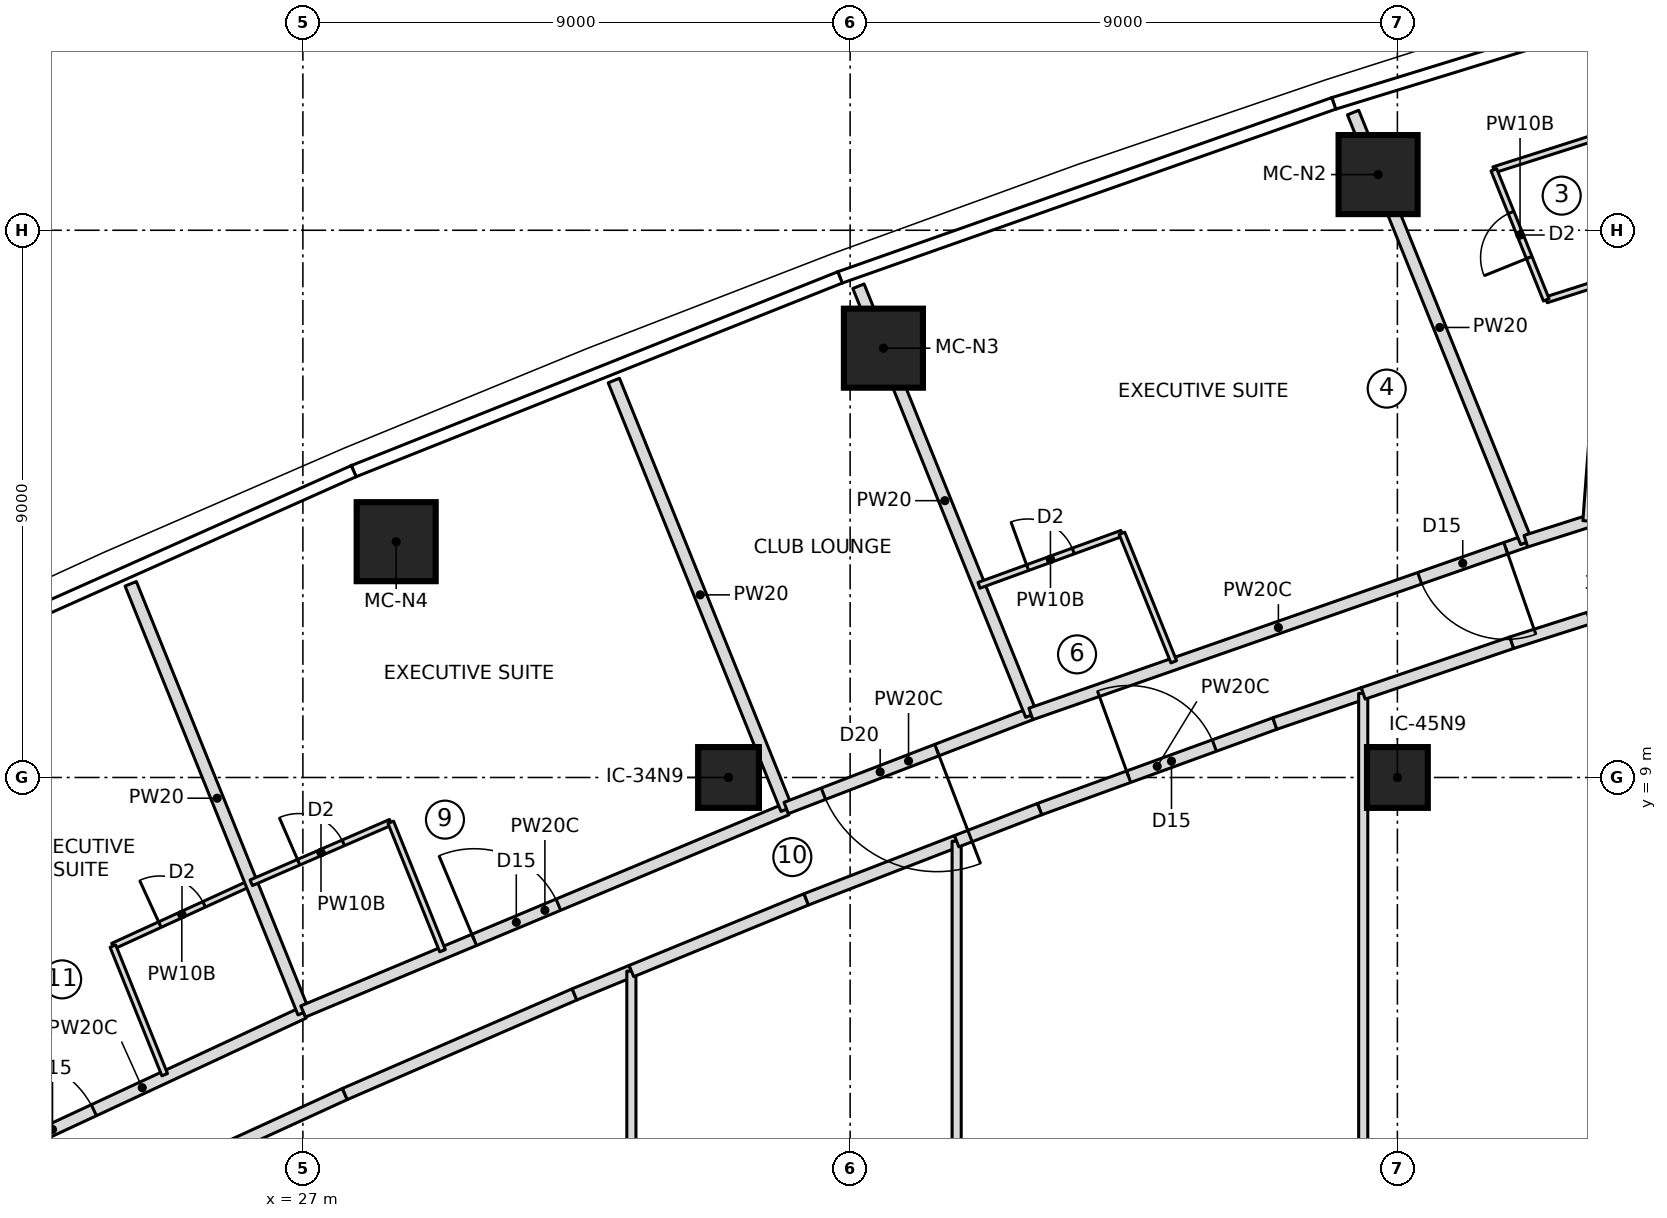
"""IFC4 building model, lengths in metres.
Left out: names, types, materials, properties, quantities, classifications, styles, units other than length and angle.
Written with IfcOpenShell. Run it as: python <this file> out.ifc"""

import sys

from ifc_helpers import new_model, si_unit, direction, frame, frame_2d, origin, origin_2d, place, context, subcontext, project, spatial, rectangle, extrude, element, fill, save


model = new_model("IFC4")
c1 = context("Model", 3, precision=1e-05, world=origin(), true_north=direction((0.0, 1.0)))
c2 = subcontext(c1, "Body", "Model", "MODEL_VIEW")
j1 = project(units=[si_unit("LENGTHUNIT", "METRE"), si_unit("PLANEANGLEUNIT", "RADIAN")], contexts=[c1])
p1 = place(None, origin())
s1 = spatial("IfcSite", under=j1, at=p1, CompositionType="ELEMENT")
p2 = place(p1, origin())
s2 = spatial("IfcBuilding", under=s1, at=p2, CompositionType="ELEMENT")
p3 = place(p2, frame((0.0, 0.0, 200.35)))
s3 = spatial("IfcBuildingStorey", under=s2, at=p3, CompositionType="ELEMENT", Elevation=200.35)
for number, where, z_axis, x_axis in (
    (1, (44.683, 18.916, 0.0), (0.0, 0.0, 1.0), (1.0, 0.0, 0.0)),
    (2, (36.547, 16.061, 0.0), (0.0, 0.0, 1.0), (1.0, 0.0, 0.0)),
    (3, (28.534, 12.878, 0.0), (0.0, 0.0, 1.0), (1.0, 0.0, 0.0)),
):
    element("IfcColumn", number, at=place(p3, frame(where, z_axis=z_axis, x_axis=x_axis)), inside=s3, PredefinedType="COLUMN", context=c2, shape_type="SweptSolid", body=[
        extrude(rectangle(XDim=1.3, YDim=1.3, at=origin_2d()), origin(), (0.0, 0.0, 1.0), 3.55),
    ])
for number, where, z_axis, x_axis in (
    (4, (34.0, 9.0, 0.0), (0.0, 0.0, 1.0), (1.0, 0.0, 0.0)),
    (5, (45.0, 9.0, 0.0), (0.0, 0.0, 1.0), (1.0, 0.0, 0.0)),
):
    element("IfcColumn", number, at=place(p3, frame(where, z_axis=z_axis, x_axis=x_axis)), inside=s3, PredefinedType="COLUMN", context=c2, shape_type="SweptSolid", body=[
        extrude(rectangle(XDim=1.0, YDim=1.0, at=origin_2d()), origin(), (0.0, 0.0, 1.0), 3.55),
    ])
p4 = place(p3, frame((21.704, 2.663, 0.0), z_axis=(0.0, 0.0, 1.0), x_axis=(0.906619470853, 0.421949209112, 0.0)))
e6 = element("IfcWall", 6, at=p4, inside=s3, PredefinedType="PARTITIONING", context=c2, shape_type="SweptSolid", body=[
    extrude(rectangle(XDim=5.854, YDim=0.2, at=frame_2d((2.927, 0.0))), origin(), (0.0, 0.0, 1.0), 3.25),
])
p5 = place(p4, frame((0.55, 0.0, 0.0)))
e7 = element("IfcOpeningElement", 7, at=p5, cuts=e6, PredefinedType="OPENING", context=c2, shape_type="SweptSolid", body=[
    extrude(rectangle(XDim=1.5, YDim=2.1, at=frame_2d((0.75, 1.05))), frame((0.0, 0.11, 0.0), z_axis=(0.0, -1.0, 0.0), x_axis=(1.0, 0.0, 0.0)), (0.0, 0.0, 1.0), 0.22),
])
p6 = place(p3, frame((23.875, 6.226, 0.0), z_axis=(0.0, 0.0, 1.0), x_axis=(0.909145169949, 0.416479363183, 0.0)))
e8 = element("IfcWall", 8, at=p6, inside=s3, PredefinedType="PARTITIONING", context=c2, shape_type="SweptSolid", body=[
    extrude(rectangle(XDim=2.493, YDim=0.1, at=frame_2d((1.247, 0.0))), origin(), (0.0, 0.0, 1.0), 3.25),
])
p7 = place(p6, frame((0.85, 0.0, 0.0)))
e9 = element("IfcOpeningElement", 9, at=p7, cuts=e8, PredefinedType="OPENING", context=c2, shape_type="SweptSolid", body=[
    extrude(rectangle(XDim=0.8, YDim=2.1, at=frame_2d((0.4, 1.05))), frame((0.0, 0.06, 0.0), z_axis=(0.0, -1.0, 0.0), x_axis=(1.0, 0.0, 0.0)), (0.0, 0.0, 1.0), 0.12),
])
p8 = place(p3, frame((24.728, 4.112, 0.0), z_axis=(0.0, 0.0, 1.0), x_axis=(-0.373790023037, 0.927513352291, 0.0)))
e10 = element("IfcWall", 10, at=p8, inside=s3, PredefinedType="PARTITIONING", context=c2, shape_type="SweptSolid", body=[
    extrude(rectangle(XDim=2.28, YDim=0.1, at=frame_2d((1.14, 0.0))), origin(), (0.0, 0.0, 1.0), 3.25),
])
p9 = place(p3, frame((27.012, 5.133, 0.0), z_axis=(0.0, 0.0, 1.0), x_axis=(-0.373913547423, 0.927463562116, 0.0)))
e11 = element("IfcWall", 11, at=p9, inside=s3, PredefinedType="PARTITIONING", context=c2, shape_type="SweptSolid", body=[
    extrude(rectangle(XDim=7.604, YDim=0.2, at=frame_2d((3.802, 0.0))), origin(), (0.0, 0.0, 1.0), 3.25),
])
p10 = place(p3, frame((27.004, 5.151, 0.0), z_axis=(0.0, 0.0, 1.0), x_axis=(0.922490953728, 0.386018704586, 0.0)))
e12 = element("IfcWall", 12, at=p10, inside=s3, PredefinedType="PARTITIONING", context=c2, shape_type="SweptSolid", body=[
    extrude(rectangle(XDim=8.62, YDim=0.2, at=frame_2d((4.31, 0.0))), origin(), (0.0, 0.0, 1.0), 3.25),
])
p11 = place(p10, frame((3.05, 0.0, 0.0)))
e13 = element("IfcOpeningElement", 13, at=p11, cuts=e12, PredefinedType="OPENING", context=c2, shape_type="SweptSolid", body=[
    extrude(rectangle(XDim=1.5, YDim=2.1, at=frame_2d((0.75, 1.05))), frame((0.0, 0.11, 0.0), z_axis=(0.0, -1.0, 0.0), x_axis=(1.0, 0.0, 0.0)), (0.0, 0.0, 1.0), 0.22),
])
p12 = place(p3, frame((26.151, 7.268, 0.0), z_axis=(0.0, 0.0, 1.0), x_axis=(0.917378641232, 0.398015613526, 0.0)))
e14 = element("IfcWall", 14, at=p12, inside=s3, PredefinedType="PARTITIONING", context=c2, shape_type="SweptSolid", body=[
    extrude(rectangle(XDim=2.501, YDim=0.1, at=frame_2d((1.25, 0.0))), origin(), (0.0, 0.0, 1.0), 3.25),
])
p13 = place(p12, frame((0.85, 0.0, 0.0)))
e15 = element("IfcOpeningElement", 15, at=p13, cuts=e14, PredefinedType="OPENING", context=c2, shape_type="SweptSolid", body=[
    extrude(rectangle(XDim=0.8, YDim=2.1, at=frame_2d((0.4, 1.05))), frame((0.0, 0.06, 0.0), z_axis=(0.0, -1.0, 0.0), x_axis=(1.0, 0.0, 0.0)), (0.0, 0.0, 1.0), 0.12),
])
p14 = place(p3, frame((28.445, 8.263, 0.0), z_axis=(0.0, 0.0, 1.0), x_axis=(0.373902898623, -0.927467855185, 0.0)))
e16 = element("IfcWall", 16, at=p14, inside=s3, PredefinedType="PARTITIONING", context=c2, shape_type="SweptSolid", body=[
    extrude(rectangle(XDim=2.278, YDim=0.1, at=frame_2d((1.139, 0.0))), origin(), (0.0, 0.0, 1.0), 3.25),
])
p15 = place(p3, frame((34.956, 8.479, 0.0), z_axis=(0.0, 0.0, 1.0), x_axis=(-0.373881438439, 0.927476506436, 0.0)))
e17 = element("IfcWall", 17, at=p15, inside=s3, PredefinedType="PARTITIONING", context=c2, shape_type="SweptSolid", body=[
    extrude(rectangle(XDim=7.601, YDim=0.2, at=frame_2d((3.8, 0.0))), origin(), (0.0, 0.0, 1.0), 3.25),
])
p16 = place(p3, frame((38.972, 10.045, 0.0), z_axis=(0.0, 0.0, 1.0), x_axis=(-0.93335728106, -0.358948723208, 0.0)))
e18 = element("IfcWall", 18, at=p16, inside=s3, PredefinedType="PARTITIONING", context=c2, shape_type="SweptSolid", body=[
    extrude(rectangle(XDim=4.312, YDim=0.2, at=frame_2d((2.156, 0.0))), origin(), (0.0, 0.0, 1.0), 3.25),
])
p17 = place(p16, frame((1.656, 0.0, 0.0)))
e19 = element("IfcOpeningElement", 19, at=p17, cuts=e18, PredefinedType="OPENING", context=c2, shape_type="SweptSolid", body=[
    extrude(rectangle(XDim=2.0, YDim=2.4, at=frame_2d((1.0, 1.2))), frame((0.0, 0.11, 0.0), z_axis=(0.0, -1.0, 0.0), x_axis=(1.0, 0.0, 0.0)), (0.0, 0.0, 1.0), 0.22),
])
p18 = place(p3, frame((38.98, 10.026, 0.0), z_axis=(0.0, 0.0, 1.0), x_axis=(-0.373863662938, 0.927483671843, 0.0)))
e20 = element("IfcWall", 20, at=p18, inside=s3, PredefinedType="PARTITIONING", context=c2, shape_type="SweptSolid", body=[
    extrude(rectangle(XDim=7.604, YDim=0.2, at=frame_2d((3.802, 0.0))), origin(), (0.0, 0.0, 1.0), 3.25),
])
p19 = place(p3, frame((47.113, 12.886, 0.0), z_axis=(0.0, 0.0, 1.0), x_axis=(-0.944155939639, -0.329498955453, 0.0)))
e21 = element("IfcWall", 21, at=p19, inside=s3, PredefinedType="PARTITIONING", context=c2, shape_type="SweptSolid", body=[
    extrude(rectangle(XDim=8.622, YDim=0.2, at=frame_2d((4.311, 0.0))), origin(), (0.0, 0.0, 1.0), 3.25),
])
p20 = place(p19, frame((0.35, 0.0, 0.0)))
e22 = element("IfcOpeningElement", 22, at=p20, cuts=e21, PredefinedType="OPENING", context=c2, shape_type="SweptSolid", body=[
    extrude(rectangle(XDim=1.5, YDim=2.1, at=frame_2d((0.75, 1.05))), frame((0.0, 0.11, 0.0), z_axis=(0.0, -1.0, 0.0), x_axis=(1.0, 0.0, 0.0)), (0.0, 0.0, 1.0), 0.22),
])
p21 = place(p3, frame((38.119, 12.161, 0.0), z_axis=(0.0, 0.0, 1.0), x_axis=(0.939744972593, 0.341876273652, 0.0)))
e23 = element("IfcWall", 23, at=p21, inside=s3, PredefinedType="PARTITIONING", context=c2, shape_type="SweptSolid", body=[
    extrude(rectangle(XDim=2.501, YDim=0.1, at=frame_2d((1.251, 0.0))), origin(), (0.0, 0.0, 1.0), 3.25),
])
p22 = place(p21, frame((0.85, 0.0, 0.0)))
e24 = element("IfcOpeningElement", 24, at=p22, cuts=e23, PredefinedType="OPENING", context=c2, shape_type="SweptSolid", body=[
    extrude(rectangle(XDim=0.8, YDim=2.1, at=frame_2d((0.4, 1.05))), frame((0.0, 0.06, 0.0), z_axis=(0.0, -1.0, 0.0), x_axis=(1.0, 0.0, 0.0)), (0.0, 0.0, 1.0), 0.12),
])
p23 = place(p3, frame((40.47, 13.016, 0.0), z_axis=(0.0, 0.0, 1.0), x_axis=(0.373846436826, -0.927490615409, 0.0)))
e25 = element("IfcWall", 25, at=p23, inside=s3, PredefinedType="PARTITIONING", context=c2, shape_type="SweptSolid", body=[
    extrude(rectangle(XDim=2.279, YDim=0.1, at=frame_2d((1.139, 0.0))), origin(), (0.0, 0.0, 1.0), 3.25),
])
p24 = place(p3, frame((47.121, 12.867, 0.0), z_axis=(0.0, 0.0, 1.0), x_axis=(-0.373907892596, 0.92746584188, 0.0)))
e26 = element("IfcWall", 26, at=p24, inside=s3, PredefinedType="PARTITIONING", context=c2, shape_type="SweptSolid", body=[
    extrude(rectangle(XDim=7.621, YDim=0.2, at=frame_2d((3.811, 0.0))), origin(), (0.0, 0.0, 1.0), 3.25),
])
p25 = place(p3, frame((46.586, 18.994, 0.0), z_axis=(0.0, 0.0, 1.0), x_axis=(0.952696570315, 0.303923090451, 0.0)))
e27 = element("IfcWall", 27, at=p25, inside=s3, PredefinedType="PARTITIONING", context=c2, shape_type="SweptSolid", body=[
    extrude(rectangle(XDim=1.933, YDim=0.1, at=frame_2d((0.966, 0.0))), origin(), (0.0, 0.0, 1.0), 3.25),
])
p26 = place(p3, frame((48.427, 17.167, 0.0), z_axis=(0.0, 0.0, 1.0), x_axis=(-0.952763220029, -0.303714086864, 0.0)))
e28 = element("IfcWall", 28, at=p26, inside=s3, PredefinedType="PARTITIONING", context=c2, shape_type="SweptSolid", body=[
    extrude(rectangle(XDim=1.027, YDim=0.1, at=frame_2d((0.513, 0.0))), origin(), (0.0, 0.0, 1.0), 3.25),
])
p27 = place(p3, frame((47.448, 16.855, 0.0), z_axis=(0.0, 0.0, 1.0), x_axis=(-0.373817051068, 0.927502459474, 0.0)))
e29 = element("IfcWall", 29, at=p27, inside=s3, PredefinedType="PARTITIONING", context=c2, shape_type="SweptSolid", body=[
    extrude(rectangle(XDim=2.306, YDim=0.1, at=frame_2d((1.153, 0.0))), origin(), (0.0, 0.0, 1.0), 3.25),
])
p28 = place(p27, frame((0.75, 0.0, 0.0)))
e30 = element("IfcOpeningElement", 30, at=p28, cuts=e29, PredefinedType="OPENING", context=c2, shape_type="SweptSolid", body=[
    extrude(rectangle(XDim=0.8, YDim=2.1, at=frame_2d((0.4, 1.05))), frame((0.0, 0.06, 0.0), z_axis=(0.0, -1.0, 0.0), x_axis=(1.0, 0.0, 0.0)), (0.0, 0.0, 1.0), 0.12),
])
p29 = place(p3, frame((23.947, 2.079, 0.0), z_axis=(0.0, 0.0, 1.0), x_axis=(0.909180834404, 0.416401501382, 0.0)))
e31 = element("IfcWall", 31, at=p29, inside=s3, PredefinedType="PARTITIONING", context=c2, shape_type="SweptSolid", body=[
    extrude(rectangle(XDim=4.117, YDim=0.2, at=frame_2d((2.059, 0.0))), origin(), (0.0, 0.0, 1.0), 3.25),
])
p30 = place(p3, frame((27.69, 3.793, 0.0), z_axis=(0.0, 0.0, 1.0), x_axis=(0.917375244839, 0.398023441717, 0.0)))
e32 = element("IfcWall", 32, at=p30, inside=s3, PredefinedType="PARTITIONING", context=c2, shape_type="SweptSolid", body=[
    extrude(rectangle(XDim=4.117, YDim=0.2, at=frame_2d((2.059, 0.0))), origin(), (0.0, 0.0, 1.0), 3.25),
])
p31 = place(p3, frame((31.467, 5.432, 0.0), z_axis=(0.0, 0.0, 1.0), x_axis=(0.925212079844, 0.379450401648, 0.0)))
e33 = element("IfcWall", 33, at=p31, inside=s3, PredefinedType="PARTITIONING", context=c2, shape_type="SweptSolid", body=[
    extrude(rectangle(XDim=1.011, YDim=0.2, at=frame_2d((0.506, 0.0))), origin(), (0.0, 0.0, 1.0), 3.25),
])
p32 = place(p3, frame((32.402, -5.816, 0.0), z_axis=(0.0, 0.0, 1.0), x_axis=(0.0, 1.0, 0.0)))
e34 = element("IfcWall", 34, at=p32, inside=s3, PredefinedType="PARTITIONING", context=c2, shape_type="SweptSolid", body=[
    extrude(rectangle(XDim=11.632, YDim=0.15, at=frame_2d((5.816, 0.0))), origin(), (0.0, 0.0, 1.0), 3.25),
])
p33 = place(p3, frame((35.276, 6.994, 0.0), z_axis=(0.0, 0.0, 1.0), x_axis=(0.932689885878, 0.360679326801, 0.0)))
e35 = element("IfcWall", 35, at=p33, inside=s3, PredefinedType="PARTITIONING", context=c2, shape_type="SweptSolid", body=[
    extrude(rectangle(XDim=2.655, YDim=0.2, at=frame_2d((1.327, 0.0))), origin(), (0.0, 0.0, 1.0), 3.25),
])
p34 = place(p3, frame((32.402, 5.816, 0.0), z_axis=(0.0, 0.0, 1.0), x_axis=(0.925204713675, 0.379468362045, 0.0)))
e36 = element("IfcWall", 36, at=p34, inside=s3, PredefinedType="PARTITIONING", context=c2, shape_type="SweptSolid", body=[
    extrude(rectangle(XDim=3.105, YDim=0.2, at=frame_2d((1.553, 0.0))), origin(), (0.0, 0.0, 1.0), 3.25),
])
p35 = place(p3, frame((37.752, -7.952, 0.0), z_axis=(0.0, 0.0, 1.0), x_axis=(0.0, 1.0, 0.0)))
e37 = element("IfcWall", 37, at=p35, inside=s3, PredefinedType="PARTITIONING", context=c2, shape_type="SweptSolid", body=[
    extrude(rectangle(XDim=15.904, YDim=0.15, at=frame_2d((7.952, 0.0))), origin(), (0.0, 0.0, 1.0), 3.25),
])
p36 = place(p3, frame((39.115, 8.479, 0.0), z_axis=(0.0, 0.0, 1.0), x_axis=(0.939727613335, 0.341923986779, 0.0)))
e38 = element("IfcWall", 38, at=p36, inside=s3, PredefinedType="PARTITIONING", context=c2, shape_type="SweptSolid", body=[
    extrude(rectangle(XDim=4.117, YDim=0.2, at=frame_2d((2.059, 0.0))), origin(), (0.0, 0.0, 1.0), 3.25),
])
p37 = place(p36, frame((1.559, 0.0, 0.0)))
e39 = element("IfcOpeningElement", 39, at=p37, cuts=e38, PredefinedType="OPENING", context=c2, shape_type="SweptSolid", body=[
    extrude(rectangle(XDim=1.5, YDim=2.1, at=frame_2d((0.75, 1.05))), frame((0.0, 0.11, 0.0), z_axis=(0.0, -1.0, 0.0), x_axis=(1.0, 0.0, 0.0)), (0.0, 0.0, 1.0), 0.22),
])
p38 = place(p3, frame((42.984, 9.887, 0.0), z_axis=(0.0, 0.0, 1.0), x_axis=(0.946450589454, 0.32284869788, 0.0)))
e40 = element("IfcWall", 40, at=p38, inside=s3, PredefinedType="PARTITIONING", context=c2, shape_type="SweptSolid", body=[
    extrude(rectangle(XDim=1.536, YDim=0.2, at=frame_2d((0.768, 0.0))), origin(), (0.0, 0.0, 1.0), 3.25),
])
p39 = place(p3, frame((37.752, 7.952, 0.0), z_axis=(0.0, 0.0, 1.0), x_axis=(0.932642417559, 0.360802052335, 0.0)))
e41 = element("IfcWall", 41, at=p39, inside=s3, PredefinedType="PARTITIONING", context=c2, shape_type="SweptSolid", body=[
    extrude(rectangle(XDim=1.462, YDim=0.2, at=frame_2d((0.731, 0.0))), origin(), (0.0, 0.0, 1.0), 3.25),
])
p40 = place(p3, frame((44.438, -10.383, 0.0), z_axis=(0.0, 0.0, 1.0), x_axis=(0.0, 1.0, 0.0)))
e42 = element("IfcWall", 42, at=p40, inside=s3, PredefinedType="PARTITIONING", context=c2, shape_type="SweptSolid", body=[
    extrude(rectangle(XDim=20.766, YDim=0.15, at=frame_2d((10.383, 0.0))), origin(), (0.0, 0.0, 1.0), 3.25),
])
p41 = place(p3, frame((44.438, 10.383, 0.0), z_axis=(0.0, 0.0, 1.0), x_axis=(0.946427432629, 0.322916575554, 0.0)))
e43 = element("IfcWall", 43, at=p41, inside=s3, PredefinedType="PARTITIONING", context=c2, shape_type="SweptSolid", body=[
    extrude(rectangle(XDim=2.581, YDim=0.2, at=frame_2d((1.291, 0.0))), origin(), (0.0, 0.0, 1.0), 3.25),
])
p42 = place(p3, frame((48.15, 13.217, 0.0), z_axis=(0.0, 0.0, 1.0), x_axis=(-0.952731090451, -0.303814860215, 0.0)))
e44 = element("IfcWall", 44, at=p42, inside=s3, PredefinedType="PARTITIONING", context=c2, shape_type="SweptSolid", body=[
    extrude(rectangle(XDim=1.088, YDim=0.2, at=frame_2d((0.544, 0.0))), origin(), (0.0, 0.0, 1.0), 3.25),
])
p43 = place(p3, frame((46.881, 11.217, 0.0), z_axis=(0.0, 0.0, 1.0), x_axis=(0.952761948983, 0.303718074157, 0.0)))
e45 = element("IfcWall", 45, at=p43, inside=s3, PredefinedType="PARTITIONING", context=c2, shape_type="SweptSolid", body=[
    extrude(rectangle(XDim=1.332, YDim=0.2, at=frame_2d((0.666, 0.0))), origin(), (0.0, 0.0, 1.0), 3.25),
])
p44 = place(p3, frame((48.445, 17.145, 0.0), z_axis=(0.0, 0.0, 1.0), x_axis=(-0.074933243819, -0.997188552366, 0.0)))
e46 = element("IfcWall", 46, at=p44, inside=s3, PredefinedType="PARTITIONING", context=c2, shape_type="SweptSolid", body=[
    extrude(rectangle(XDim=3.939, YDim=0.2, at=frame_2d((1.969, 0.0))), origin(), (0.0, 0.0, 1.0), 3.25),
])
p45 = place(p44, frame((1.47, 0.0, 0.0)))
e47 = element("IfcOpeningElement", 47, at=p45, cuts=e46, PredefinedType="OPENING", context=c2, shape_type="SweptSolid", body=[
    extrude(rectangle(XDim=1.0, YDim=2.1, at=frame_2d((0.5, 1.05))), frame((0.0, 0.11, 0.0), z_axis=(0.0, -1.0, 0.0), x_axis=(1.0, 0.0, 0.0)), (0.0, 0.0, 1.0), 0.22),
])
p46 = place(p7, origin())
e48 = element("IfcDoor", 48, at=p46, inside=s3, OperationType="SINGLE_SWING_LEFT", PredefinedType="DOOR", context=c2, shape_type="SweptSolid", body=[
    extrude(rectangle(XDim=0.8, YDim=2.1, at=frame_2d((0.4, 1.05))), frame((0.0, 0.025, 0.0), z_axis=(0.0, -1.0, 0.0), x_axis=(1.0, 0.0, 0.0)), (0.0, 0.0, 1.0), 0.05),
])
fill(e9, e48)
p47 = place(p5, origin())
e49 = element("IfcDoor", 49, at=p47, inside=s3, OperationType="DOUBLE_DOOR_SINGLE_SWING", PredefinedType="DOOR", context=c2, shape_type="SweptSolid", body=[
    extrude(rectangle(XDim=1.5, YDim=2.1, at=frame_2d((0.75, 1.05))), frame((0.0, 0.025, 0.0), z_axis=(0.0, -1.0, 0.0), x_axis=(1.0, 0.0, 0.0)), (0.0, 0.0, 1.0), 0.05),
])
fill(e7, e49)
p48 = place(p13, origin())
e50 = element("IfcDoor", 50, at=p48, inside=s3, OperationType="SINGLE_SWING_LEFT", PredefinedType="DOOR", context=c2, shape_type="SweptSolid", body=[
    extrude(rectangle(XDim=0.8, YDim=2.1, at=frame_2d((0.4, 1.05))), frame((0.0, 0.025, 0.0), z_axis=(0.0, -1.0, 0.0), x_axis=(1.0, 0.0, 0.0)), (0.0, 0.0, 1.0), 0.05),
])
fill(e15, e50)
p49 = place(p11, origin())
e51 = element("IfcDoor", 51, at=p49, inside=s3, OperationType="DOUBLE_DOOR_SINGLE_SWING", PredefinedType="DOOR", context=c2, shape_type="SweptSolid", body=[
    extrude(rectangle(XDim=1.5, YDim=2.1, at=frame_2d((0.75, 1.05))), frame((0.0, 0.025, 0.0), z_axis=(0.0, -1.0, 0.0), x_axis=(1.0, 0.0, 0.0)), (0.0, 0.0, 1.0), 0.05),
])
fill(e13, e51)
p50 = place(p17, origin())
e52 = element("IfcDoor", 52, at=p50, inside=s3, OperationType="DOUBLE_DOOR_SINGLE_SWING", PredefinedType="DOOR", context=c2, shape_type="SweptSolid", body=[
    extrude(rectangle(XDim=2.0, YDim=2.4, at=frame_2d((1.0, 1.2))), frame((0.0, 0.025, 0.0), z_axis=(0.0, -1.0, 0.0), x_axis=(1.0, 0.0, 0.0)), (0.0, 0.0, 1.0), 0.05),
])
fill(e19, e52)
p51 = place(p22, origin())
e53 = element("IfcDoor", 53, at=p51, inside=s3, OperationType="SINGLE_SWING_LEFT", PredefinedType="DOOR", context=c2, shape_type="SweptSolid", body=[
    extrude(rectangle(XDim=0.8, YDim=2.1, at=frame_2d((0.4, 1.05))), frame((0.0, 0.025, 0.0), z_axis=(0.0, -1.0, 0.0), x_axis=(1.0, 0.0, 0.0)), (0.0, 0.0, 1.0), 0.05),
])
fill(e24, e53)
p52 = place(p20, origin())
e54 = element("IfcDoor", 54, at=p52, inside=s3, OperationType="DOUBLE_DOOR_SINGLE_SWING", PredefinedType="DOOR", context=c2, shape_type="SweptSolid", body=[
    extrude(rectangle(XDim=1.5, YDim=2.1, at=frame_2d((0.75, 1.05))), frame((0.0, 0.025, 0.0), z_axis=(0.0, -1.0, 0.0), x_axis=(1.0, 0.0, 0.0)), (0.0, 0.0, 1.0), 0.05),
])
fill(e22, e54)
p53 = place(p28, origin())
e55 = element("IfcDoor", 55, at=p53, inside=s3, OperationType="SINGLE_SWING_LEFT", PredefinedType="DOOR", context=c2, shape_type="SweptSolid", body=[
    extrude(rectangle(XDim=0.8, YDim=2.1, at=frame_2d((0.4, 1.05))), frame((0.0, 0.025, 0.0), z_axis=(0.0, -1.0, 0.0), x_axis=(1.0, 0.0, 0.0)), (0.0, 0.0, 1.0), 0.05),
])
fill(e30, e55)
p54 = place(p37, origin())
e56 = element("IfcDoor", 56, at=p54, inside=s3, OperationType="DOUBLE_DOOR_SINGLE_SWING", PredefinedType="DOOR", context=c2, shape_type="SweptSolid", body=[
    extrude(rectangle(XDim=1.5, YDim=2.1, at=frame_2d((0.75, 1.05))), frame((0.0, 0.025, 0.0), z_axis=(0.0, -1.0, 0.0), x_axis=(1.0, 0.0, 0.0)), (0.0, 0.0, 1.0), 0.05),
])
fill(e39, e56)
save(model, sys.argv[1])
